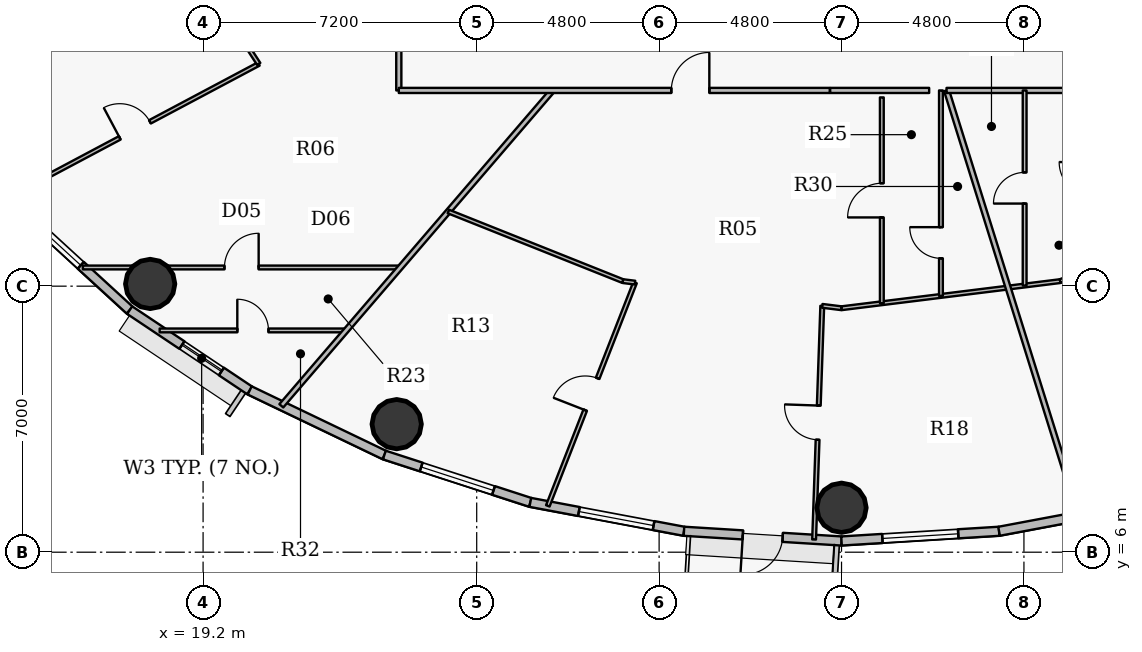
"""IFC4 building model, lengths in metres.
Left out: names, types, materials, properties, quantities, classifications, styles, units other than length and angle.
Written with IfcOpenShell. Run it as: python <this file> out.ifc"""

import sys

from ifc_helpers import new_model, si_unit, direction, frame, frame_2d, origin, origin_2d, place, context, subcontext, project, spatial, rectangle, hollow_circle, extrude, source, transform, mapped, element, fill, save


model = new_model("IFC4")
c1 = context("Model", 3, precision=1e-05, world=origin(), true_north=direction((0.0, 1.0)))
c2 = subcontext(c1, "Body", "Model", "MODEL_VIEW")
j1 = project(units=[si_unit("LENGTHUNIT", "METRE"), si_unit("PLANEANGLEUNIT", "RADIAN")], contexts=[c1])
p1 = place(None, origin())
s1 = spatial("IfcSite", under=j1, at=p1, CompositionType="ELEMENT")
p2 = place(p1, origin())
s2 = spatial("IfcBuilding", under=s1, at=p2, CompositionType="ELEMENT")
p3 = place(p2, frame((0.0, 0.0, 178.65)))
s3 = spatial("IfcBuildingStorey", under=s2, at=p3, CompositionType="ELEMENT", Elevation=178.65)
for number, where, z_axis, x_axis in (
    (1, (17.808, 13.058, 0.0), (0.0, 0.0, 1.0), (1.0, 0.0, 0.0)),
    (2, (24.294, 9.369, 0.0), (0.0, 0.0, 1.0), (1.0, 0.0, 0.0)),
    (3, (36.0, 7.17, 0.0), (0.0, 0.0, 1.0), (1.0, 0.0, 0.0)),
):
    element("IfcColumn", number, at=place(p3, frame(where, z_axis=z_axis, x_axis=x_axis)), inside=s3, PredefinedType="COLUMN", context=c2, shape_type="SweptSolid", body=[
        extrude(hollow_circle(Radius=0.65, WallThickness=0.04, at=origin_2d()), origin(), (0.0, 0.0, 1.0), 3.75),
    ])
p4 = place(p3, frame((17.268, 12.369, 0.0), z_axis=(0.0, 0.0, 1.0), x_axis=(-0.737076565834, 0.675809245349, 0.0)))
e4 = element("IfcWall", 4, at=p4, inside=s3, PredefinedType="SOLIDWALL", context=c2, shape_type="SweptSolid", body=[
    extrude(rectangle(XDim=3.658, YDim=0.24, at=frame_2d((1.829, 0.0))), origin(), (0.0, 0.0, 1.0), 3.5),
])
p5 = place(p4, frame((1.746, 0.0, 0.9)))
e5 = element("IfcOpeningElement", 5, at=p5, cuts=e4, PredefinedType="OPENING", context=c2, shape_type="SweptSolid", body=[
    extrude(rectangle(XDim=1.25, YDim=1.65, at=origin_2d()), frame((0.625, 0.13, 0.825), z_axis=(0.0, -1.0, 0.0), x_axis=(1.0, 0.0, 0.0)), (0.0, 0.0, 1.0), 0.26),
])
p6 = place(p3, frame((20.427, 10.257, 0.0), z_axis=(0.0, 0.0, 1.0), x_axis=(-0.831228998277, 0.555930168657, 0.0)))
e6 = element("IfcWall", 6, at=p6, inside=s3, PredefinedType="SOLIDWALL", context=c2, shape_type="SweptSolid", body=[
    extrude(rectangle(XDim=3.8, YDim=0.24, at=frame_2d((1.9, 0.0))), origin(), (0.0, 0.0, 1.0), 3.5),
])
p7 = place(p6, frame((0.896, 0.0, 0.9)))
e7 = element("IfcOpeningElement", 7, at=p7, cuts=e6, PredefinedType="OPENING", context=c2, shape_type="SweptSolid", body=[
    extrude(rectangle(XDim=1.25, YDim=1.65, at=origin_2d()), frame((0.625, 0.13, 0.825), z_axis=(0.0, -1.0, 0.0), x_axis=(1.0, 0.0, 0.0)), (0.0, 0.0, 1.0), 0.26),
])
p8 = place(p3, frame((23.97, 8.556, 0.0), z_axis=(0.0, 0.0, 1.0), x_axis=(-0.901564733809, 0.432644231155, 0.0)))
e8 = element("IfcWall", 8, at=p8, inside=s3, PredefinedType="SOLIDWALL", context=c2, shape_type="SweptSolid", body=[
    extrude(rectangle(XDim=3.93, YDim=0.24, at=frame_2d((1.965, 0.0))), origin(), (0.0, 0.0, 1.0), 3.5),
])
p9 = place(p3, frame((27.811, 7.311, 0.0), z_axis=(0.0, 0.0, 1.0), x_axis=(-0.951209870236, 0.30854462038, 0.0)))
e9 = element("IfcWall", 9, at=p9, inside=s3, PredefinedType="SOLIDWALL", context=c2, shape_type="SweptSolid", body=[
    extrude(rectangle(XDim=4.038, YDim=0.24, at=frame_2d((2.019, 0.0))), origin(), (0.0, 0.0, 1.0), 3.5),
])
p10 = place(p9, frame((1.019, 0.0, 0.9)))
e10 = element("IfcOpeningElement", 10, at=p10, cuts=e9, PredefinedType="OPENING", context=c2, shape_type="SweptSolid", body=[
    extrude(rectangle(XDim=2.0, YDim=1.75, at=origin_2d()), frame((1.0, 0.13, 0.875), z_axis=(0.0, -1.0, 0.0), x_axis=(1.0, 0.0, 0.0)), (0.0, 0.0, 1.0), 0.26),
])
p11 = place(p3, frame((31.854, 6.551, 0.0), z_axis=(0.0, 0.0, 1.0), x_axis=(-0.982788108205, 0.184736391573, 0.0)))
e11 = element("IfcWall", 11, at=p11, inside=s3, PredefinedType="SOLIDWALL", context=c2, shape_type="SweptSolid", body=[
    extrude(rectangle(XDim=4.114, YDim=0.24, at=frame_2d((2.057, 0.0))), origin(), (0.0, 0.0, 1.0), 3.5),
])
p12 = place(p11, frame((0.814, 0.0, 0.9)))
e12 = element("IfcOpeningElement", 12, at=p12, cuts=e11, PredefinedType="OPENING", context=c2, shape_type="SweptSolid", body=[
    extrude(rectangle(XDim=2.0, YDim=1.75, at=origin_2d()), frame((1.0, 0.13, 0.875), z_axis=(0.0, -1.0, 0.0), x_axis=(1.0, 0.0, 0.0)), (0.0, 0.0, 1.0), 0.26),
])
p13 = place(p3, frame((36.0, 6.295, 0.0), z_axis=(0.0, 0.0, 1.0), x_axis=(-0.998104600619, 0.061540281305, 0.0)))
e13 = element("IfcWall", 13, at=p13, inside=s3, PredefinedType="SOLIDWALL", context=c2, shape_type="SweptSolid", body=[
    extrude(rectangle(XDim=4.154, YDim=0.24, at=frame_2d((2.077, 0.0))), origin(), (0.0, 0.0, 1.0), 3.5),
])
p14 = place(p13, frame((1.552, 0.0, 0.0)))
e14 = element("IfcOpeningElement", 14, at=p14, cuts=e13, PredefinedType="OPENING", context=c2, shape_type="SweptSolid", body=[
    extrude(rectangle(XDim=1.05, YDim=2.15, at=origin_2d()), frame((0.525, 0.13, 1.075), z_axis=(0.0, -1.0, 0.0), x_axis=(1.0, 0.0, 0.0)), (0.0, 0.0, 1.0), 0.26),
])
p15 = place(p3, frame((40.146, 6.551, 0.0), z_axis=(0.0, 0.0, 1.0), x_axis=(-0.998104600619, -0.061540281305, 0.0)))
e15 = element("IfcWall", 15, at=p15, inside=s3, PredefinedType="SOLIDWALL", context=c2, shape_type="SweptSolid", body=[
    extrude(rectangle(XDim=4.154, YDim=0.24, at=frame_2d((2.077, 0.0))), origin(), (0.0, 0.0, 1.0), 3.5),
])
p16 = place(p15, frame((1.077, 0.0, 0.9)))
e16 = element("IfcOpeningElement", 16, at=p16, cuts=e15, PredefinedType="OPENING", context=c2, shape_type="SweptSolid", body=[
    extrude(rectangle(XDim=2.0, YDim=1.75, at=origin_2d()), frame((1.0, 0.13, 0.875), z_axis=(0.0, -1.0, 0.0), x_axis=(1.0, 0.0, 0.0)), (0.0, 0.0, 1.0), 0.26),
])
p17 = place(p3, frame((44.189, 7.311, 0.0), z_axis=(0.0, 0.0, 1.0), x_axis=(-0.982788108205, -0.184736391573, 0.0)))
e17 = element("IfcWall", 17, at=p17, inside=s3, PredefinedType="SOLIDWALL", context=c2, shape_type="SweptSolid", body=[
    extrude(rectangle(XDim=4.114, YDim=0.24, at=frame_2d((2.057, 0.0))), origin(), (0.0, 0.0, 1.0), 3.5),
])
p18 = place(p3, frame((14.145, 15.379, 0.0), z_axis=(0.0, 0.0, 1.0), x_axis=(0.882946160832, 0.469474256027, 0.0)))
e18 = element("IfcWall", 18, at=p18, inside=s3, PredefinedType="PARTITIONING", context=c2, shape_type="SweptSolid", body=[
    extrude(rectangle(XDim=7.385, YDim=0.1, at=frame_2d((3.692, 0.0))), origin(), (0.0, 0.0, 1.0), 2.935),
])
p19 = place(p18, frame((3.242, 0.0, 0.0)))
e19 = element("IfcOpeningElement", 19, at=p19, cuts=e18, PredefinedType="OPENING", context=c2, shape_type="SweptSolid", body=[
    extrude(rectangle(XDim=0.9, YDim=2.1, at=origin_2d()), frame((0.45, 0.06, 1.05), z_axis=(0.0, -1.0, 0.0), x_axis=(1.0, 0.0, 0.0)), (0.0, 0.0, 1.0), 0.12),
])
p20 = place(p3, frame((16.037, 13.491, 0.0), z_axis=(0.0, 0.0, 1.0), x_axis=(1.0, 0.0, 0.0)))
e20 = element("IfcWall", 20, at=p20, inside=s3, PredefinedType="PARTITIONING", context=c2, shape_type="SweptSolid", body=[
    extrude(rectangle(XDim=8.35, YDim=0.1, at=frame_2d((4.175, 0.0))), origin(), (0.0, 0.0, 1.0), 2.935),
])
p21 = place(p20, frame((3.725, 0.0, 0.0)))
e21 = element("IfcOpeningElement", 21, at=p21, cuts=e20, PredefinedType="OPENING", context=c2, shape_type="SweptSolid", body=[
    extrude(rectangle(XDim=0.9, YDim=2.1, at=origin_2d()), frame((0.45, 0.06, 1.05), z_axis=(0.0, -1.0, 0.0), x_axis=(1.0, 0.0, 0.0)), (0.0, 0.0, 1.0), 0.12),
])
p22 = place(p3, frame((18.057, 11.836, 0.0), z_axis=(0.0, 0.0, 1.0), x_axis=(1.0, 0.0, 0.0)))
e22 = element("IfcWall", 22, at=p22, inside=s3, PredefinedType="PARTITIONING", context=c2, shape_type="SweptSolid", body=[
    extrude(rectangle(XDim=4.907, YDim=0.1, at=frame_2d((2.453, 0.0))), origin(), (0.0, 0.0, 1.0), 2.935),
])
p23 = place(p22, frame((2.043, 0.0, 0.0)))
e23 = element("IfcOpeningElement", 23, at=p23, cuts=e22, PredefinedType="OPENING", context=c2, shape_type="SweptSolid", body=[
    extrude(rectangle(XDim=0.82, YDim=2.1, at=origin_2d()), frame((0.41, 0.06, 1.05), z_axis=(0.0, -1.0, 0.0), x_axis=(1.0, 0.0, 0.0)), (0.0, 0.0, 1.0), 0.12),
])
p24 = place(p3, frame((18.291, 22.494, 0.0), z_axis=(0.0, 0.0, 1.0), x_axis=(0.545410225271, -0.838169246734, 0.0)))
e24 = element("IfcWall", 24, at=p24, inside=s3, PredefinedType="PARTITIONING", context=c2, shape_type="SweptSolid", body=[
    extrude(rectangle(XDim=4.352, YDim=0.1, at=frame_2d((2.176, 0.0))), origin(), (0.0, 0.0, 1.0), 2.935),
])
p25 = place(p3, frame((21.259, 9.852, 0.0), z_axis=(0.0, 0.0, 1.0), x_axis=(0.651889454341, 0.758314011026, 0.0)))
e25 = element("IfcWall", 25, at=p25, inside=s3, PredefinedType="PARTITIONING", context=c2, shape_type="SweptSolid", body=[
    extrude(rectangle(XDim=10.942, YDim=0.135, at=frame_2d((5.471, 0.0))), origin(), (0.0, 0.0, 1.0), 2.935),
])
p26 = place(p3, frame((24.35, 18.15, 0.0), z_axis=(0.0, 0.0, 1.0), x_axis=(0.0, 1.0, 0.0)))
e26 = element("IfcWall", 26, at=p26, inside=s3, PredefinedType="PARTITIONING", context=c2, shape_type="SweptSolid", body=[
    extrude(rectangle(XDim=7.485, YDim=0.135, at=frame_2d((3.742, 0.0))), origin(), (0.0, 0.0, 1.0), 2.935),
])
p27 = place(p26, frame((3.242, 0.0, 0.0)))
e27 = element("IfcOpeningElement", 27, at=p27, cuts=e26, PredefinedType="OPENING", context=c2, shape_type="SweptSolid", body=[
    extrude(rectangle(XDim=1.0, YDim=2.15, at=origin_2d()), frame((0.5, 0.078, 1.075), z_axis=(0.0, -1.0, 0.0), x_axis=(1.0, 0.0, 0.0)), (0.0, 0.0, 1.0), 0.155),
])
p28 = place(p3, frame((24.35, 18.15, 0.0), z_axis=(0.0, 0.0, 1.0), x_axis=(1.0, 0.0, 0.0)))
e28 = element("IfcWall", 28, at=p28, inside=s3, PredefinedType="PARTITIONING", context=c2, shape_type="SweptSolid", body=[
    extrude(rectangle(XDim=11.341, YDim=0.135, at=frame_2d((5.67, 0.0))), origin(), (0.0, 0.0, 1.0), 2.935),
])
p29 = place(p28, frame((7.171, 0.0, 0.0)))
e29 = element("IfcOpeningElement", 29, at=p29, cuts=e28, PredefinedType="OPENING", context=c2, shape_type="SweptSolid", body=[
    extrude(rectangle(XDim=1.0, YDim=2.15, at=origin_2d()), frame((0.5, 0.078, 1.075), z_axis=(0.0, -1.0, 0.0), x_axis=(1.0, 0.0, 0.0)), (0.0, 0.0, 1.0), 0.155),
])
p30 = place(p3, frame((25.654, 14.965, 0.0), z_axis=(0.0, 0.0, 1.0), x_axis=(0.928793067963, -0.370598754589, 0.0)))
e30 = element("IfcWall", 30, at=p30, inside=s3, PredefinedType="PARTITIONING", context=c2, shape_type="SweptSolid", body=[
    extrude(rectangle(XDim=4.944, YDim=0.1, at=frame_2d((2.472, 0.0))), origin(), (0.0, 0.0, 1.0), 2.935),
])
p31 = place(p3, frame((28.271, 7.219, 0.0), z_axis=(0.0, 0.0, 1.0), x_axis=(0.363936593544, 0.931423725207, 0.0)))
e31 = element("IfcWall", 31, at=p31, inside=s3, PredefinedType="PARTITIONING", context=c2, shape_type="SweptSolid", body=[
    extrude(rectangle(XDim=6.306, YDim=0.1, at=frame_2d((3.153, 0.0))), origin(), (0.0, 0.0, 1.0), 2.935),
])
p32 = place(p31, frame((2.703, 0.0, 0.0)))
e32 = element("IfcOpeningElement", 32, at=p32, cuts=e31, PredefinedType="OPENING", context=c2, shape_type="SweptSolid", body=[
    extrude(rectangle(XDim=0.9, YDim=2.1, at=origin_2d()), frame((0.45, 0.06, 1.05), z_axis=(0.0, -1.0, 0.0), x_axis=(1.0, 0.0, 0.0)), (0.0, 0.0, 1.0), 0.12),
])
p33 = place(p3, frame((30.246, 13.133, 0.0), z_axis=(0.0, 0.0, 1.0), x_axis=(0.992451589144, -0.122637038475, 0.0)))
e33 = element("IfcWall", 33, at=p33, inside=s3, PredefinedType="PARTITIONING", context=c2, shape_type="SweptSolid", body=[
    extrude(rectangle(XDim=0.323, YDim=0.1, at=frame_2d((0.161, 0.0))), origin(), (0.0, 0.0, 1.0), 3.5),
])
p34 = place(p3, frame((35.278, 6.334, 0.0), z_axis=(0.0, 0.0, 1.0), x_axis=(0.034887406989, 0.999391249128, 0.0)))
e34 = element("IfcWall", 34, at=p34, inside=s3, PredefinedType="PARTITIONING", context=c2, shape_type="SweptSolid", body=[
    extrude(rectangle(XDim=6.151, YDim=0.1, at=frame_2d((3.076, 0.0))), origin(), (0.0, 0.0, 1.0), 2.935),
])
p35 = place(p34, frame((2.625, 0.0, 0.0)))
e35 = element("IfcOpeningElement", 35, at=p35, cuts=e34, PredefinedType="OPENING", context=c2, shape_type="SweptSolid", body=[
    extrude(rectangle(XDim=0.9, YDim=2.1, at=origin_2d()), frame((0.45, 0.06, 1.05), z_axis=(0.0, -1.0, 0.0), x_axis=(1.0, 0.0, 0.0)), (0.0, 0.0, 1.0), 0.12),
])
p36 = place(p3, frame((35.493, 12.482, 0.0), z_axis=(0.0, 0.0, 1.0), x_axis=(0.992373140554, -0.123270231229, 0.0)))
e36 = element("IfcWall", 36, at=p36, inside=s3, PredefinedType="PARTITIONING", context=c2, shape_type="SweptSolid", body=[
    extrude(rectangle(XDim=0.511, YDim=0.1, at=frame_2d((0.255, 0.0))), origin(), (0.0, 0.0, 1.0), 2.935),
])
p37 = place(p3, frame((36.0, 12.419, 0.0), z_axis=(0.0, 0.0, 1.0), x_axis=(0.992396615981, 0.123081097612, 0.0)))
e37 = element("IfcWall", 37, at=p37, inside=s3, PredefinedType="PARTITIONING", context=c2, shape_type="SweptSolid", body=[
    extrude(rectangle(XDim=5.798, YDim=0.1, at=frame_2d((2.899, 0.0))), origin(), (0.0, 0.0, 1.0), 2.935),
])
p38 = place(p3, frame((37.061, 12.551, 0.0), z_axis=(0.0, 0.0, 1.0), x_axis=(0.0, 1.0, 0.0)))
e38 = element("IfcWall", 38, at=p38, inside=s3, PredefinedType="PARTITIONING", context=c2, shape_type="SweptSolid", body=[
    extrude(rectangle(XDim=5.416, YDim=0.1, at=frame_2d((2.708, 0.0))), origin(), (0.0, 0.0, 1.0), 3.035),
])
p39 = place(p38, frame((2.258, 0.0, 0.0)))
e39 = element("IfcOpeningElement", 39, at=p39, cuts=e38, PredefinedType="OPENING", context=c2, shape_type="SweptSolid", body=[
    extrude(rectangle(XDim=0.9, YDim=2.1, at=origin_2d()), frame((0.45, 0.06, 1.05), z_axis=(0.0, -1.0, 0.0), x_axis=(1.0, 0.0, 0.0)), (0.0, 0.0, 1.0), 0.12),
])
p40 = place(p3, frame((38.616, 12.743, 0.0), z_axis=(0.0, 0.0, 1.0), x_axis=(0.0, 1.0, 0.0)))
e40 = element("IfcWall", 40, at=p40, inside=s3, PredefinedType="PARTITIONING", context=c2, shape_type="SweptSolid", body=[
    extrude(rectangle(XDim=5.406, YDim=0.1, at=frame_2d((2.703, 0.0))), origin(), (0.0, 0.0, 1.0), 3.035),
])
p41 = place(p40, frame((0.989, 0.0, 0.0)))
e41 = element("IfcOpeningElement", 41, at=p41, cuts=e40, PredefinedType="OPENING", context=c2, shape_type="SweptSolid", body=[
    extrude(rectangle(XDim=0.82, YDim=2.1, at=origin_2d()), frame((0.41, 0.06, 1.05), z_axis=(0.0, -1.0, 0.0), x_axis=(1.0, 0.0, 0.0)), (0.0, 0.0, 1.0), 0.12),
])
p42 = place(p3, frame((38.764, 18.15, 0.0), z_axis=(0.0, 0.0, 1.0), x_axis=(0.298084348379, -0.954539533624, 0.0)))
e42 = element("IfcWall", 42, at=p42, inside=s3, PredefinedType="PARTITIONING", context=c2, shape_type="SweptSolid", body=[
    extrude(rectangle(XDim=11.74, YDim=0.135, at=frame_2d((5.87, 0.0))), origin(), (0.0, 0.0, 1.0), 2.935),
])
p43 = place(p3, frame((38.764, 18.15, 0.0), z_axis=(0.0, 0.0, 1.0), x_axis=(1.0, 0.0, 0.0)))
e43 = element("IfcWall", 43, at=p43, inside=s3, PredefinedType="PARTITIONING", context=c2, shape_type="SweptSolid", body=[
    extrude(rectangle(XDim=9.436, YDim=0.135, at=frame_2d((4.718, 0.0))), origin(), (0.0, 0.0, 1.0), 2.935),
])
p44 = place(p43, frame((6.13, 0.0, 0.0)))
e44 = element("IfcOpeningElement", 44, at=p44, cuts=e43, PredefinedType="OPENING", context=c2, shape_type="SweptSolid", body=[
    extrude(rectangle(XDim=1.0, YDim=2.15, at=origin_2d()), frame((0.5, 0.078, 1.075), z_axis=(0.0, -1.0, 0.0), x_axis=(1.0, 0.0, 0.0)), (0.0, 0.0, 1.0), 0.155),
])
p45 = place(p3, frame((40.819, 13.017, 0.0), z_axis=(0.0, 0.0, 1.0), x_axis=(0.0, 1.0, 0.0)))
e45 = element("IfcWall", 45, at=p45, inside=s3, PredefinedType="PARTITIONING", context=c2, shape_type="SweptSolid", body=[
    extrude(rectangle(XDim=5.133, YDim=0.1, at=frame_2d((2.567, 0.0))), origin(), (0.0, 0.0, 1.0), 2.935),
])
p46 = place(p45, frame((2.157, 0.0, 0.0)))
e46 = element("IfcOpeningElement", 46, at=p46, cuts=e45, PredefinedType="OPENING", context=c2, shape_type="SweptSolid", body=[
    extrude(rectangle(XDim=0.82, YDim=2.1, at=origin_2d()), frame((0.41, 0.06, 1.05), z_axis=(0.0, -1.0, 0.0), x_axis=(1.0, 0.0, 0.0)), (0.0, 0.0, 1.0), 0.12),
])
p47 = place(p3, frame((41.754, 13.133, 0.0), z_axis=(0.0, 0.0, 1.0), x_axis=(0.928786664236, 0.370614803182, 0.0)))
e47 = element("IfcWall", 47, at=p47, inside=s3, PredefinedType="PARTITIONING", context=c2, shape_type="SweptSolid", body=[
    extrude(rectangle(XDim=3.798, YDim=0.1, at=frame_2d((1.899, 0.0))), origin(), (0.0, 0.0, 1.0), 2.935),
])
p48 = place(p3, frame((38.306, 18.15, 0.0), z_axis=(0.0, 0.0, 1.0), x_axis=(-1.0, 0.0, 0.0)))
e48 = element("IfcWall", 48, at=p48, inside=s3, PredefinedType="PARTITIONING", context=c2, shape_type="SweptSolid", body=[
    extrude(rectangle(XDim=2.605, YDim=0.135, at=frame_2d((1.302, 0.0))), origin(), (0.0, 0.0, 1.0), 2.935),
])
m1 = source(origin(), c2, "Body", "SweptSolid", [
    extrude(rectangle(XDim=1.25, YDim=1.65, at=origin_2d()), frame((0.625, 0.03, 0.825), z_axis=(0.0, -1.0, 0.0), x_axis=(1.0, 0.0, 0.0)), (0.0, 0.0, 1.0), 0.06),
])
p49 = place(p7, origin())
e49 = element("IfcWindow", 49, at=p49, inside=s3, PartitioningType="SINGLE_PANEL", PredefinedType="WINDOW", context=c2, shape_type="MappedRepresentation", body=[
    mapped(m1, transform((0.0, 0.0, 0.0), x_axis=(1.0, 0.0, 0.0), y_axis=(0.0, 1.0, 0.0), z_axis=(0.0, 0.0, 1.0), scale=1.0)),
])
fill(e7, e49)
m2 = source(origin(), c2, "Body", "SweptSolid", [
    extrude(rectangle(XDim=2.0, YDim=1.75, at=origin_2d()), frame((1.0, 0.03, 0.875), z_axis=(0.0, -1.0, 0.0), x_axis=(1.0, 0.0, 0.0)), (0.0, 0.0, 1.0), 0.06),
])
p50 = place(p10, origin())
e50 = element("IfcWindow", 50, at=p50, inside=s3, PartitioningType="DOUBLE_PANEL_VERTICAL", PredefinedType="WINDOW", context=c2, shape_type="MappedRepresentation", body=[
    mapped(m2, transform((0.0, 0.0, 0.0), x_axis=(1.0, 0.0, 0.0), y_axis=(0.0, 1.0, 0.0), z_axis=(0.0, 0.0, 1.0), scale=1.0)),
])
fill(e10, e50)
p51 = place(p12, origin())
e51 = element("IfcWindow", 51, at=p51, inside=s3, PartitioningType="DOUBLE_PANEL_VERTICAL", PredefinedType="WINDOW", context=c2, shape_type="MappedRepresentation", body=[
    mapped(m2, transform((0.0, 0.0, 0.0), x_axis=(1.0, 0.0, 0.0), y_axis=(0.0, 1.0, 0.0), z_axis=(0.0, 0.0, 1.0), scale=1.0)),
])
fill(e12, e51)
m3 = source(origin(), c2, "Body", "SweptSolid", [
    extrude(rectangle(XDim=1.05, YDim=2.15, at=origin_2d()), frame((0.525, 0.025, 1.075), z_axis=(0.0, -1.0, 0.0), x_axis=(1.0, 0.0, 0.0)), (0.0, 0.0, 1.0), 0.05),
])
p52 = place(p14, origin())
e52 = element("IfcDoor", 52, at=p52, inside=s3, OperationType="SINGLE_SWING_RIGHT", PredefinedType="DOOR", context=c2, shape_type="MappedRepresentation", body=[
    mapped(m3, transform((0.0, 0.0, 0.0), x_axis=(1.0, 0.0, 0.0), y_axis=(0.0, 1.0, 0.0), z_axis=(0.0, 0.0, 1.0), scale=1.0)),
])
fill(e14, e52)
p53 = place(p16, origin())
e53 = element("IfcWindow", 53, at=p53, inside=s3, PartitioningType="DOUBLE_PANEL_VERTICAL", PredefinedType="WINDOW", context=c2, shape_type="MappedRepresentation", body=[
    mapped(m2, transform((0.0, 0.0, 0.0), x_axis=(1.0, 0.0, 0.0), y_axis=(0.0, 1.0, 0.0), z_axis=(0.0, 0.0, 1.0), scale=1.0)),
])
fill(e16, e53)
p54 = place(p5, origin())
e54 = element("IfcWindow", 54, at=p54, inside=s3, PartitioningType="SINGLE_PANEL", PredefinedType="WINDOW", context=c2, shape_type="MappedRepresentation", body=[
    mapped(m1, transform((0.0, 0.0, 0.0), x_axis=(1.0, 0.0, 0.0), y_axis=(0.0, 1.0, 0.0), z_axis=(0.0, 0.0, 1.0), scale=1.0)),
])
fill(e5, e54)
m4 = source(origin(), c2, "Body", "SweptSolid", [
    extrude(rectangle(XDim=0.9, YDim=2.1, at=origin_2d()), frame((0.45, 0.025, 1.05), z_axis=(0.0, -1.0, 0.0), x_axis=(1.0, 0.0, 0.0)), (0.0, 0.0, 1.0), 0.05),
])
p55 = place(p19, origin())
e55 = element("IfcDoor", 55, at=p55, inside=s3, OperationType="SINGLE_SWING_LEFT", PredefinedType="DOOR", context=c2, shape_type="MappedRepresentation", body=[
    mapped(m4, transform((0.0, 0.0, 0.0), x_axis=(1.0, 0.0, 0.0), y_axis=(0.0, 1.0, 0.0), z_axis=(0.0, 0.0, 1.0), scale=1.0)),
])
fill(e19, e55)
p56 = place(p21, origin())
e56 = element("IfcDoor", 56, at=p56, inside=s3, OperationType="SINGLE_SWING_RIGHT", PredefinedType="DOOR", context=c2, shape_type="MappedRepresentation", body=[
    mapped(m4, transform((0.0, 0.0, 0.0), x_axis=(1.0, 0.0, 0.0), y_axis=(0.0, 1.0, 0.0), z_axis=(0.0, 0.0, 1.0), scale=1.0)),
])
fill(e21, e56)
m5 = source(origin(), c2, "Body", "SweptSolid", [
    extrude(rectangle(XDim=0.82, YDim=2.1, at=origin_2d()), frame((0.41, 0.025, 1.05), z_axis=(0.0, -1.0, 0.0), x_axis=(1.0, 0.0, 0.0)), (0.0, 0.0, 1.0), 0.05),
])
p57 = place(p23, origin())
e57 = element("IfcDoor", 57, at=p57, inside=s3, OperationType="SINGLE_SWING_LEFT", PredefinedType="DOOR", context=c2, shape_type="MappedRepresentation", body=[
    mapped(m5, transform((0.0, 0.0, 0.0), x_axis=(1.0, 0.0, 0.0), y_axis=(0.0, 1.0, 0.0), z_axis=(0.0, 0.0, 1.0), scale=1.0)),
])
fill(e23, e57)
m6 = source(origin(), c2, "Body", "SweptSolid", [
    extrude(rectangle(XDim=1.0, YDim=2.15, at=origin_2d()), frame((0.5, 0.025, 1.075), z_axis=(0.0, -1.0, 0.0), x_axis=(1.0, 0.0, 0.0)), (0.0, 0.0, 1.0), 0.05),
])
p58 = place(p29, origin())
e58 = element("IfcDoor", 58, at=p58, inside=s3, OperationType="SINGLE_SWING_RIGHT", PredefinedType="DOOR", context=c2, shape_type="MappedRepresentation", body=[
    mapped(m6, transform((0.0, 0.0, 0.0), x_axis=(1.0, 0.0, 0.0), y_axis=(0.0, 1.0, 0.0), z_axis=(0.0, 0.0, 1.0), scale=1.0)),
])
fill(e29, e58)
p59 = place(p32, origin())
e59 = element("IfcDoor", 59, at=p59, inside=s3, OperationType="SINGLE_SWING_LEFT", PredefinedType="DOOR", context=c2, shape_type="MappedRepresentation", body=[
    mapped(m4, transform((0.0, 0.0, 0.0), x_axis=(1.0, 0.0, 0.0), y_axis=(0.0, 1.0, 0.0), z_axis=(0.0, 0.0, 1.0), scale=1.0)),
])
fill(e32, e59)
p60 = place(p35, origin())
e60 = element("IfcDoor", 60, at=p60, inside=s3, OperationType="SINGLE_SWING_RIGHT", PredefinedType="DOOR", context=c2, shape_type="MappedRepresentation", body=[
    mapped(m4, transform((0.0, 0.0, 0.0), x_axis=(1.0, 0.0, 0.0), y_axis=(0.0, 1.0, 0.0), z_axis=(0.0, 0.0, 1.0), scale=1.0)),
])
fill(e35, e60)
p61 = place(p39, origin())
e61 = element("IfcDoor", 61, at=p61, inside=s3, OperationType="SINGLE_SWING_LEFT", PredefinedType="DOOR", context=c2, shape_type="MappedRepresentation", body=[
    mapped(m4, transform((0.0, 0.0, 0.0), x_axis=(1.0, 0.0, 0.0), y_axis=(0.0, 1.0, 0.0), z_axis=(0.0, 0.0, 1.0), scale=1.0)),
])
fill(e39, e61)
p62 = place(p41, origin())
e62 = element("IfcDoor", 62, at=p62, inside=s3, OperationType="SINGLE_SWING_RIGHT", PredefinedType="DOOR", context=c2, shape_type="MappedRepresentation", body=[
    mapped(m5, transform((0.0, 0.0, 0.0), x_axis=(1.0, 0.0, 0.0), y_axis=(0.0, 1.0, 0.0), z_axis=(0.0, 0.0, 1.0), scale=1.0)),
])
fill(e41, e62)
p63 = place(p46, origin())
e63 = element("IfcDoor", 63, at=p63, inside=s3, OperationType="SINGLE_SWING_LEFT", PredefinedType="DOOR", context=c2, shape_type="MappedRepresentation", body=[
    mapped(m5, transform((0.0, 0.0, 0.0), x_axis=(1.0, 0.0, 0.0), y_axis=(0.0, 1.0, 0.0), z_axis=(0.0, 0.0, 1.0), scale=1.0)),
])
fill(e46, e63)
save(model, sys.argv[1])
